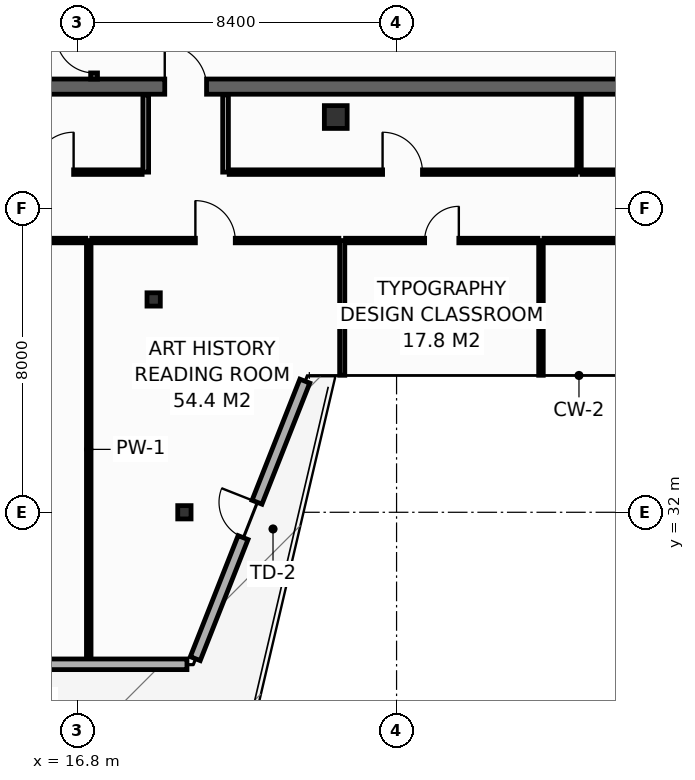
"""IFC4 building model, lengths in metres.
Left out: names, types, materials, properties, quantities, classifications, styles, units other than length and angle.
Written with IfcOpenShell. Run it as: python <this file> out.ifc"""

import sys

from ifc_helpers import new_model, si_unit, direction, frame, frame_2d, origin, origin_2d, place, context, subcontext, project, spatial, rectangle, hollow_rectangle, extrude, element, fill, save


model = new_model("IFC4")
c1 = context("Model", 3, precision=1e-05, world=origin(), true_north=direction((0.0, 1.0)))
c2 = subcontext(c1, "Body", "Model", "MODEL_VIEW")
j1 = project(units=[si_unit("LENGTHUNIT", "METRE"), si_unit("PLANEANGLEUNIT", "RADIAN")], contexts=[c1])
p1 = place(None, origin())
s1 = spatial("IfcSite", under=j1, at=p1, CompositionType="ELEMENT")
p2 = place(p1, origin())
s2 = spatial("IfcBuilding", under=s1, at=p2, CompositionType="ELEMENT")
p3 = place(p2, frame((0.0, 0.0, 276.2)))
s3 = spatial("IfcBuildingStorey", under=s2, at=p3, CompositionType="ELEMENT", Elevation=276.2)
p4 = place(p3, frame((13.7, 43.2, 0.0), z_axis=(0.0, 0.0, 1.0), x_axis=(1.0, 0.0, 0.0)))
e1 = element("IfcWall", 1, at=p4, inside=s3, PredefinedType="SHEAR", context=c2, shape_type="SweptSolid", body=[
    extrude(rectangle(XDim=32.5, YDim=0.4, at=frame_2d((16.25, 0.0))), origin(), (0.0, 0.0, 1.0), 3.55),
])
p5 = place(p4, frame((5.4, 0.0, 0.0)))
e2 = element("IfcOpeningElement", 2, at=p5, cuts=e1, PredefinedType="OPENING", context=c2, shape_type="SweptSolid", body=[
    extrude(rectangle(XDim=1.1, YDim=2.15, at=frame_2d((0.55, 1.075))), frame((0.0, 0.21, 0.0), z_axis=(0.0, -1.0, 0.0), x_axis=(1.0, 0.0, 0.0)), (0.0, 0.0, 1.0), 0.42),
])
p6 = place(p4, frame((25.6, 0.0, 0.0)))
e3 = element("IfcOpeningElement", 3, at=p6, cuts=e1, PredefinedType="OPENING", context=c2, shape_type="SweptSolid", body=[
    extrude(rectangle(XDim=1.1, YDim=2.15, at=frame_2d((0.55, 1.075))), frame((0.0, 0.21, 0.0), z_axis=(0.0, -1.0, 0.0), x_axis=(1.0, 0.0, 0.0)), (0.0, 0.0, 1.0), 0.42),
])
p7 = place(p3, frame((23.6, 42.4, 0.0), z_axis=(0.0, 0.0, 1.0), x_axis=(1.0, 0.0, 0.0)))
e4 = element("IfcColumn", 4, at=p7, inside=s3, PredefinedType="COLUMN", context=c2, shape_type="SweptSolid", body=[
    extrude(hollow_rectangle(XDim=0.6, YDim=0.6, WallThickness=0.028, at=origin_2d()), origin(), (0.0, 0.0, 1.0), 3.8),
])
for number, where, z_axis, x_axis in (
    (5, (19.617, 32.0, 0.0), (0.0, 0.0, 1.0), (1.0, 0.0, 0.0)),
    (6, (18.808, 37.6, 0.0), (0.0, 0.0, 1.0), (1.0, 0.0, 0.0)),
):
    element("IfcColumn", number, at=place(p3, frame(where, z_axis=z_axis, x_axis=x_axis)), inside=s3, PredefinedType="COLUMN", context=c2, shape_type="SweptSolid", body=[
        extrude(hollow_rectangle(XDim=0.35, YDim=0.35, WallThickness=0.016, at=origin_2d()), origin(), (0.0, 0.0, 1.0), 3.8),
    ])
p8 = place(p3, frame((17.24, 43.4, 0.0), z_axis=(0.0, 0.0, 1.0), x_axis=(0.0, 1.0, 0.0)))
e7 = element("IfcWall", 7, at=p8, inside=s3, PredefinedType="SHEAR", context=c2, shape_type="SweptSolid", body=[
    extrude(rectangle(XDim=10.4, YDim=0.18, at=frame_2d((5.2, 0.0))), origin(), (0.0, 0.0, 1.0), 3.55),
])
p9 = place(p8, frame((0.16, 0.0, 0.0)))
e8 = element("IfcOpeningElement", 8, at=p9, cuts=e7, PredefinedType="OPENING", context=c2, shape_type="SweptSolid", body=[
    extrude(rectangle(XDim=1.0, YDim=2.15, at=frame_2d((0.5, 1.075))), frame((0.0, 0.1, 0.0), z_axis=(0.0, -1.0, 0.0), x_axis=(1.0, 0.0, 0.0)), (0.0, 0.0, 1.0), 0.2),
])
p10 = place(p3, frame((11.404, 28.0, 0.0), z_axis=(0.0, 0.0, 1.0), x_axis=(1.0, 0.0, 0.0)))
e9 = element("IfcWall", 9, at=p10, inside=s3, PredefinedType="STANDARD", context=c2, shape_type="SweptSolid", body=[
    extrude(rectangle(XDim=8.28, YDim=0.28, at=frame_2d((4.14, 0.0))), origin(), (0.0, 0.0, 1.0), 3.55),
])
p11 = place(p10, frame((3.64, 0.0, 0.0)))
e10 = element("IfcOpeningElement", 10, at=p11, cuts=e9, PredefinedType="OPENING", context=c2, shape_type="SweptSolid", body=[
    extrude(rectangle(XDim=1.0, YDim=2.2, at=frame_2d((0.5, 1.1))), frame((0.0, 0.15, 0.0), z_axis=(0.0, -1.0, 0.0), x_axis=(1.0, 0.0, 0.0)), (0.0, 0.0, 1.0), 0.3),
])
p12 = place(p3, frame((19.903, 28.149, 0.0), z_axis=(0.0, 0.0, 1.0), x_axis=(0.367167242766, 0.930154941846, 0.0)))
e11 = element("IfcWall", 11, at=p12, inside=s3, PredefinedType="STANDARD", context=c2, shape_type="SweptSolid", body=[
    extrude(rectangle(XDim=7.851, YDim=0.28, at=frame_2d((3.925, 0.0))), origin(), (0.0, 0.0, 1.0), 3.55),
])
p13 = place(p12, frame((3.425, 0.0, 0.0)))
e12 = element("IfcOpeningElement", 12, at=p13, cuts=e11, PredefinedType="OPENING", context=c2, shape_type="SweptSolid", body=[
    extrude(rectangle(XDim=1.0, YDim=2.2, at=frame_2d((0.5, 1.1))), frame((0.0, 0.15, 0.0), z_axis=(0.0, -1.0, 0.0), x_axis=(1.0, 0.0, 0.0)), (0.0, 0.0, 1.0), 0.3),
])
for number, where, z_axis, x_axis in (
    (13, (18.6, 40.95, 0.0), (0.0, 0.0, 1.0), (0.0, 1.0, 0.0)),
    (14, (20.7, 40.95, 0.0), (0.0, 0.0, 1.0), (0.0, 1.0, 0.0)),
):
    element("IfcWall", number, at=place(p3, frame(where, z_axis=z_axis, x_axis=x_axis)), inside=s3, PredefinedType="PARTITIONING", context=c2, shape_type="SweptSolid", body=[
        extrude(rectangle(XDim=2.03, YDim=0.15, at=frame_2d((1.015, 0.0))), origin(), (0.0, 0.0, 1.0), 3.55),
    ])
p14 = place(p3, frame((13.85, 40.95, 0.0), z_axis=(0.0, 0.0, 1.0), x_axis=(1.0, 0.0, 0.0)))
e15 = element("IfcWall", 15, at=p14, inside=s3, PredefinedType="PARTITIONING", context=c2, shape_type="SweptSolid", body=[
    extrude(rectangle(XDim=4.655, YDim=0.12, at=frame_2d((2.327, 0.0))), origin(), (0.0, 0.0, 1.0), 3.55),
])
p15 = place(p14, frame((1.802, 0.0, 0.0)))
e16 = element("IfcOpeningElement", 16, at=p15, cuts=e15, PredefinedType="OPENING", context=c2, shape_type="SweptSolid", body=[
    extrude(rectangle(XDim=1.05, YDim=2.15, at=frame_2d((0.525, 1.075))), frame((0.0, 0.07, 0.0), z_axis=(0.0, -1.0, 0.0), x_axis=(1.0, 0.0, 0.0)), (0.0, 0.0, 1.0), 0.14),
])
p16 = place(p3, frame((30.0, 40.95, 0.0), z_axis=(0.0, 0.0, 1.0), x_axis=(0.0, 1.0, 0.0)))
e17 = element("IfcWall", 17, at=p16, inside=s3, PredefinedType="PARTITIONING", context=c2, shape_type="SweptSolid", body=[
    extrude(rectangle(XDim=2.03, YDim=0.12, at=frame_2d((1.015, 0.0))), origin(), (0.0, 0.0, 1.0), 2.947),
])
p17 = place(p3, frame((20.795, 40.95, 0.0), z_axis=(0.0, 0.0, 1.0), x_axis=(1.0, 0.0, 0.0)))
e18 = element("IfcWall", 18, at=p17, inside=s3, PredefinedType="PARTITIONING", context=c2, shape_type="SweptSolid", body=[
    extrude(rectangle(XDim=9.125, YDim=0.12, at=frame_2d((4.562, 0.0))), origin(), (0.0, 0.0, 1.0), 2.947),
])
p18 = place(p17, frame((4.037, 0.0, 0.0)))
e19 = element("IfcOpeningElement", 19, at=p18, cuts=e18, PredefinedType="OPENING", context=c2, shape_type="SweptSolid", body=[
    extrude(rectangle(XDim=1.05, YDim=2.15, at=frame_2d((0.525, 1.075))), frame((0.0, 0.07, 0.0), z_axis=(0.0, -1.0, 0.0), x_axis=(1.0, 0.0, 0.0)), (0.0, 0.0, 1.0), 0.14),
])
p19 = place(p3, frame((30.08, 40.95, 0.0), z_axis=(0.0, 0.0, 1.0), x_axis=(1.0, 0.0, 0.0)))
e20 = element("IfcWall", 20, at=p19, inside=s3, PredefinedType="PARTITIONING", context=c2, shape_type="SweptSolid", body=[
    extrude(rectangle(XDim=8.625, YDim=0.12, at=frame_2d((4.312, 0.0))), origin(), (0.0, 0.0, 1.0), 2.947),
])
p20 = place(p19, frame((3.862, 0.0, 0.0)))
e21 = element("IfcOpeningElement", 21, at=p20, cuts=e20, PredefinedType="OPENING", context=c2, shape_type="SweptSolid", body=[
    extrude(rectangle(XDim=0.9, YDim=2.1, at=frame_2d((0.45, 1.05))), frame((0.0, 0.07, 0.0), z_axis=(0.0, -1.0, 0.0), x_axis=(1.0, 0.0, 0.0)), (0.0, 0.0, 1.0), 0.14),
])
p21 = place(p3, frame((17.1, 28.16, 0.0), z_axis=(0.0, 0.0, 1.0), x_axis=(0.0, 1.0, 0.0)))
e22 = element("IfcWall", 22, at=p21, inside=s3, PredefinedType="PARTITIONING", context=c2, shape_type="SweptSolid", body=[
    extrude(rectangle(XDim=10.99, YDim=0.12, at=frame_2d((5.495, 0.0))), origin(), (0.0, 0.0, 1.0), 2.947),
])
p22 = place(p3, frame((23.77, 35.605, 0.0), z_axis=(0.0, 0.0, 1.0), x_axis=(0.0, 1.0, 0.0)))
e23 = element("IfcWall", 23, at=p22, inside=s3, PredefinedType="PARTITIONING", context=c2, shape_type="SweptSolid", body=[
    extrude(rectangle(XDim=3.545, YDim=0.135, at=frame_2d((1.772, 0.0))), origin(), (0.0, 0.0, 1.0), 3.55),
])
p23 = place(p3, frame((29.0, 35.605, 0.0), z_axis=(0.0, 0.0, 1.0), x_axis=(0.0, 1.0, 0.0)))
e24 = element("IfcWall", 24, at=p23, inside=s3, PredefinedType="PARTITIONING", context=c2, shape_type="SweptSolid", body=[
    extrude(rectangle(XDim=3.545, YDim=0.12, at=frame_2d((1.772, 0.0))), origin(), (0.0, 0.0, 1.0), 3.55),
])
p24 = place(p3, frame((6.561, 39.15, 0.0), z_axis=(0.0, 0.0, 1.0), x_axis=(1.0, 0.0, 0.0)))
e25 = element("IfcWall", 25, at=p24, inside=s3, PredefinedType="PARTITIONING", context=c2, shape_type="SweptSolid", body=[
    extrude(rectangle(XDim=10.459, YDim=0.12, at=frame_2d((5.229, 0.0))), origin(), (0.0, 0.0, 1.0), 3.085),
])
p25 = place(p24, frame((4.705, 0.0, 0.0)))
e26 = element("IfcOpeningElement", 26, at=p25, cuts=e25, PredefinedType="OPENING", context=c2, shape_type="SweptSolid", body=[
    extrude(rectangle(XDim=1.05, YDim=2.15, at=frame_2d((0.525, 1.075))), frame((0.0, 0.07, 0.0), z_axis=(0.0, -1.0, 0.0), x_axis=(1.0, 0.0, 0.0)), (0.0, 0.0, 1.0), 0.14),
])
p26 = place(p3, frame((17.18, 39.15, 0.0), z_axis=(0.0, 0.0, 1.0), x_axis=(1.0, 0.0, 0.0)))
e27 = element("IfcWall", 27, at=p26, inside=s3, PredefinedType="PARTITIONING", context=c2, shape_type="SweptSolid", body=[
    extrude(rectangle(XDim=6.503, YDim=0.12, at=frame_2d((3.251, 0.0))), origin(), (0.0, 0.0, 1.0), 2.947),
])
p27 = place(p26, frame((2.726, 0.0, 0.0)))
e28 = element("IfcOpeningElement", 28, at=p27, cuts=e27, PredefinedType="OPENING", context=c2, shape_type="SweptSolid", body=[
    extrude(rectangle(XDim=1.05, YDim=2.15, at=frame_2d((0.525, 1.075))), frame((0.0, 0.07, 0.0), z_axis=(0.0, -1.0, 0.0), x_axis=(1.0, 0.0, 0.0)), (0.0, 0.0, 1.0), 0.14),
])
p28 = place(p3, frame((23.857, 39.15, 0.0), z_axis=(0.0, 0.0, 1.0), x_axis=(1.0, 0.0, 0.0)))
e29 = element("IfcWall", 29, at=p28, inside=s3, PredefinedType="PARTITIONING", context=c2, shape_type="SweptSolid", body=[
    extrude(rectangle(XDim=5.062, YDim=0.12, at=frame_2d((2.531, 0.0))), origin(), (0.0, 0.0, 1.0), 3.55),
])
p29 = place(p28, frame((2.081, 0.0, 0.0)))
e30 = element("IfcOpeningElement", 30, at=p29, cuts=e29, PredefinedType="OPENING", context=c2, shape_type="SweptSolid", body=[
    extrude(rectangle(XDim=0.9, YDim=2.1, at=frame_2d((0.45, 1.05))), frame((0.0, 0.07, 0.0), z_axis=(0.0, -1.0, 0.0), x_axis=(1.0, 0.0, 0.0)), (0.0, 0.0, 1.0), 0.14),
])
p30 = place(p3, frame((29.08, 39.15, 0.0), z_axis=(0.0, 0.0, 1.0), x_axis=(1.0, 0.0, 0.0)))
e31 = element("IfcWall", 31, at=p30, inside=s3, PredefinedType="PARTITIONING", context=c2, shape_type="SweptSolid", body=[
    extrude(rectangle(XDim=6.502, YDim=0.12, at=frame_2d((3.251, 0.0))), origin(), (0.0, 0.0, 1.0), 3.55),
])
p31 = place(p30, frame((2.801, 0.0, 0.0)))
e32 = element("IfcOpeningElement", 32, at=p31, cuts=e31, PredefinedType="OPENING", context=c2, shape_type="SweptSolid", body=[
    extrude(rectangle(XDim=0.9, YDim=2.1, at=frame_2d((0.45, 1.05))), frame((0.0, 0.07, 0.0), z_axis=(0.0, -1.0, 0.0), x_axis=(1.0, 0.0, 0.0)), (0.0, 0.0, 1.0), 0.14),
])
p32 = place(p9, origin())
e33 = element("IfcDoor", 33, at=p32, inside=s3, OperationType="SINGLE_SWING_RIGHT", PredefinedType="DOOR", context=c2, shape_type="SweptSolid", body=[
    extrude(rectangle(XDim=1.0, YDim=2.15, at=frame_2d((0.5, 1.075))), frame((0.0, 0.025, 0.0), z_axis=(0.0, -1.0, 0.0), x_axis=(1.0, 0.0, 0.0)), (0.0, 0.0, 1.0), 0.05),
])
fill(e8, e33)
p33 = place(p5, origin())
e34 = element("IfcDoor", 34, at=p33, inside=s3, OperationType="SINGLE_SWING_LEFT", PredefinedType="DOOR", context=c2, shape_type="SweptSolid", body=[
    extrude(rectangle(XDim=1.1, YDim=2.15, at=frame_2d((0.55, 1.075))), frame((0.0, 0.025, 0.0), z_axis=(0.0, -1.0, 0.0), x_axis=(1.0, 0.0, 0.0)), (0.0, 0.0, 1.0), 0.05),
])
fill(e2, e34)
p34 = place(p13, origin())
e35 = element("IfcDoor", 35, at=p34, inside=s3, OperationType="SINGLE_SWING_RIGHT", PredefinedType="DOOR", context=c2, shape_type="SweptSolid", body=[
    extrude(rectangle(XDim=1.0, YDim=2.2, at=frame_2d((0.5, 1.1))), frame((0.0, 0.025, 0.0), z_axis=(0.0, -1.0, 0.0), x_axis=(1.0, 0.0, 0.0)), (0.0, 0.0, 1.0), 0.05),
])
fill(e12, e35)
p35 = place(p15, origin())
e36 = element("IfcDoor", 36, at=p35, inside=s3, OperationType="SINGLE_SWING_RIGHT", PredefinedType="DOOR", context=c2, shape_type="SweptSolid", body=[
    extrude(rectangle(XDim=1.05, YDim=2.15, at=frame_2d((0.525, 1.075))), frame((0.0, 0.025, 0.0), z_axis=(0.0, -1.0, 0.0), x_axis=(1.0, 0.0, 0.0)), (0.0, 0.0, 1.0), 0.05),
])
fill(e16, e36)
p36 = place(p18, origin())
e37 = element("IfcDoor", 37, at=p36, inside=s3, OperationType="SINGLE_SWING_LEFT", PredefinedType="DOOR", context=c2, shape_type="SweptSolid", body=[
    extrude(rectangle(XDim=1.05, YDim=2.15, at=frame_2d((0.525, 1.075))), frame((0.0, 0.025, 0.0), z_axis=(0.0, -1.0, 0.0), x_axis=(1.0, 0.0, 0.0)), (0.0, 0.0, 1.0), 0.05),
])
fill(e19, e37)
p37 = place(p27, origin())
e38 = element("IfcDoor", 38, at=p37, inside=s3, OperationType="SINGLE_SWING_LEFT", PredefinedType="DOOR", context=c2, shape_type="SweptSolid", body=[
    extrude(rectangle(XDim=1.05, YDim=2.15, at=frame_2d((0.525, 1.075))), frame((0.0, 0.025, 0.0), z_axis=(0.0, -1.0, 0.0), x_axis=(1.0, 0.0, 0.0)), (0.0, 0.0, 1.0), 0.05),
])
fill(e28, e38)
p38 = place(p29, origin())
e39 = element("IfcDoor", 39, at=p38, inside=s3, OperationType="SINGLE_SWING_RIGHT", PredefinedType="DOOR", context=c2, shape_type="SweptSolid", body=[
    extrude(rectangle(XDim=0.9, YDim=2.1, at=frame_2d((0.45, 1.05))), frame((0.0, 0.025, 0.0), z_axis=(0.0, -1.0, 0.0), x_axis=(1.0, 0.0, 0.0)), (0.0, 0.0, 1.0), 0.05),
])
fill(e30, e39)
save(model, sys.argv[1])
